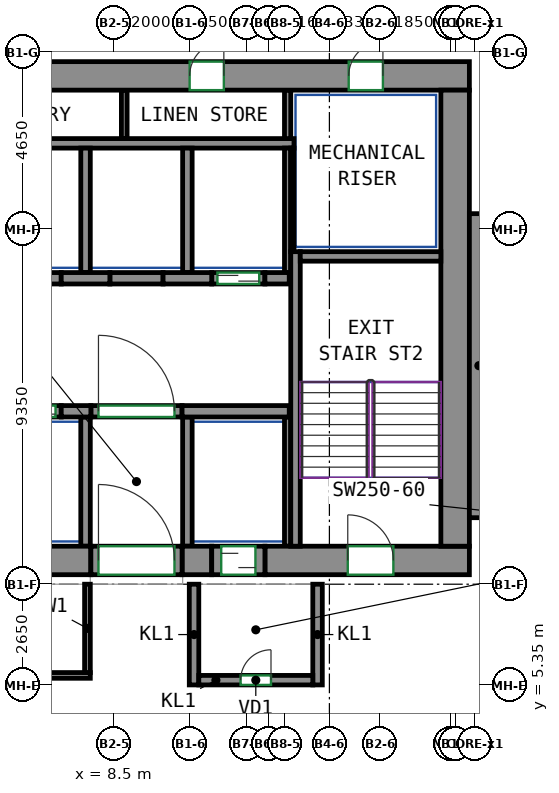
"""IFC4 building model, lengths in metres.
Left out: names, types, materials, properties, quantities, classifications, styles, units other than length and angle.
Written with IfcOpenShell. Run it as: python <this file> out.ifc"""

import sys

from ifc_helpers import new_model, si_unit, direction, frame, frame_2d, origin, place, context, subcontext, project, spatial, rectangle, extrude, source, transform, mapped, element, fill, save


model = new_model("IFC4")
c1 = context("Model", 3, precision=1e-05, world=origin(), true_north=direction((0.0, 1.0)))
c2 = subcontext(c1, "Body", "Model", "MODEL_VIEW")
j1 = project(units=[si_unit("LENGTHUNIT", "METRE"), si_unit("PLANEANGLEUNIT", "RADIAN")], contexts=[c1])
p1 = place(None, origin())
s1 = spatial("IfcSite", under=j1, at=p1, CompositionType="ELEMENT")
p2 = place(p1, origin())
s2 = spatial("IfcBuilding", under=s1, at=p2, CompositionType="ELEMENT")
p3 = place(p2, frame((0.0, 0.0, 185.5)))
s3 = spatial("IfcBuildingStorey", under=s2, at=p3, CompositionType="ELEMENT", Elevation=185.5)
m1 = source(origin(), c2, "Body", "SweptSolid", [
    extrude(rectangle(XDim=14.18, YDim=0.75, at=frame_2d((7.09, 0.0))), origin(), (0.0, 0.0, 1.0), 3.12),
])
p4 = place(p3, frame((-6.29, 8.625, 0.0), z_axis=(0.0, 0.0, 1.0), x_axis=(1.0, 0.0, 0.0)))
e1 = element("IfcWall", 1, at=p4, inside=s3, PredefinedType="SHEAR", context=c2, shape_type="MappedRepresentation", body=[
    mapped(m1, transform((0.0, 0.0, 0.0))),
])
m2 = source(origin(), c2, "Body", "SweptSolid", [
    extrude(rectangle(XDim=0.78, YDim=0.75, at=frame_2d((0.39, 0.0))), origin(), (0.0, 0.0, 1.0), 3.12),
])
p5 = place(p3, frame((10.29, 8.625, 0.0), z_axis=(0.0, 0.0, 1.0), x_axis=(1.0, 0.0, 0.0)))
e2 = element("IfcWall", 2, at=p5, inside=s3, PredefinedType="SHEAR", context=c2, shape_type="MappedRepresentation", body=[
    mapped(m2, transform((0.0, 0.0, 0.0))),
])
m3 = source(origin(), c2, "Body", "SweptSolid", [
    extrude(rectangle(XDim=5.38, YDim=0.75, at=frame_2d((2.69, 0.0))), origin(), (0.0, 0.0, 1.0), 3.12),
])
p6 = place(p3, frame((12.47, 8.625, 0.0), z_axis=(0.0, 0.0, 1.0), x_axis=(1.0, 0.0, 0.0)))
e3 = element("IfcWall", 3, at=p6, inside=s3, PredefinedType="SHEAR", context=c2, shape_type="MappedRepresentation", body=[
    mapped(m3, transform((0.0, 0.0, 0.0))),
])
p7 = place(p6, frame((2.18, 0.0, 0.0)))
e4 = element("IfcOpeningElement", 4, at=p7, cuts=e3, PredefinedType="OPENING", context=c2, shape_type="SweptSolid", body=[
    extrude(rectangle(XDim=1.2, YDim=2.1, at=frame_2d((0.6, 1.05))), frame((0.0, 0.385, 0.0), z_axis=(0.0, -1.0, 0.0), x_axis=(1.0, 0.0, 0.0)), (0.0, 0.0, 1.0), 0.77),
])
m4 = source(origin(), c2, "Body", "SweptSolid", [
    extrude(rectangle(XDim=33.6, YDim=0.75, at=frame_2d((16.8, 0.0))), origin(), (0.0, 0.0, 1.0), 3.12),
])
p8 = place(p3, frame((-15.75, 21.375, 0.0), z_axis=(0.0, 0.0, 1.0), x_axis=(1.0, 0.0, 0.0)))
e5 = element("IfcWall", 5, at=p8, inside=s3, PredefinedType="SHEAR", context=c2, shape_type="MappedRepresentation", body=[
    mapped(m4, transform((0.0, 0.0, 0.0))),
])
p9 = place(p8, frame((5.858, 0.0, 0.0)))
e6 = element("IfcOpeningElement", 6, at=p9, cuts=e5, PredefinedType="OPENING", context=c2, shape_type="SweptSolid", body=[
    extrude(rectangle(XDim=0.9, YDim=2.1, at=frame_2d((0.45, 1.05))), frame((0.0, 0.385, 0.0), z_axis=(0.0, -1.0, 0.0), x_axis=(1.0, 0.0, 0.0)), (0.0, 0.0, 1.0), 0.77),
])
p10 = place(p8, frame((10.923, 0.0, 0.0)))
e7 = element("IfcOpeningElement", 7, at=p10, cuts=e5, PredefinedType="OPENING", context=c2, shape_type="SweptSolid", body=[
    extrude(rectangle(XDim=0.9, YDim=2.1, at=frame_2d((0.45, 1.05))), frame((0.0, 0.385, 0.0), z_axis=(0.0, -1.0, 0.0), x_axis=(1.0, 0.0, 0.0)), (0.0, 0.0, 1.0), 0.77),
])
p11 = place(p8, frame((16.055, 0.0, 0.0)))
e8 = element("IfcOpeningElement", 8, at=p11, cuts=e5, PredefinedType="OPENING", context=c2, shape_type="SweptSolid", body=[
    extrude(rectangle(XDim=0.9, YDim=2.1, at=frame_2d((0.45, 1.05))), frame((0.0, 0.385, 0.0), z_axis=(0.0, -1.0, 0.0), x_axis=(1.0, 0.0, 0.0)), (0.0, 0.0, 1.0), 0.77),
])
p12 = place(p8, frame((20.879, 0.0, 0.0)))
e9 = element("IfcOpeningElement", 9, at=p12, cuts=e5, PredefinedType="OPENING", context=c2, shape_type="SweptSolid", body=[
    extrude(rectangle(XDim=0.9, YDim=2.1, at=frame_2d((0.45, 1.05))), frame((0.0, 0.385, 0.0), z_axis=(0.0, -1.0, 0.0), x_axis=(1.0, 0.0, 0.0)), (0.0, 0.0, 1.0), 0.77),
])
p13 = place(p8, frame((26.239, 0.0, 0.0)))
e10 = element("IfcOpeningElement", 10, at=p13, cuts=e5, PredefinedType="OPENING", context=c2, shape_type="SweptSolid", body=[
    extrude(rectangle(XDim=0.9, YDim=2.1, at=frame_2d((0.45, 1.05))), frame((0.0, 0.385, 0.0), z_axis=(0.0, -1.0, 0.0), x_axis=(1.0, 0.0, 0.0)), (0.0, 0.0, 1.0), 0.77),
])
p14 = place(p8, frame((2.275, 0.0, 0.0)))
e11 = element("IfcOpeningElement", 11, at=p14, cuts=e5, PredefinedType="OPENING", context=c2, shape_type="SweptSolid", body=[
    extrude(rectangle(XDim=0.9, YDim=2.1, at=frame_2d((0.45, 1.05))), frame((0.0, 0.385, 0.0), z_axis=(0.0, -1.0, 0.0), x_axis=(1.0, 0.0, 0.0)), (0.0, 0.0, 1.0), 0.77),
])
p15 = place(p8, frame((30.425, 0.0, 0.0)))
e12 = element("IfcOpeningElement", 12, at=p15, cuts=e5, PredefinedType="OPENING", context=c2, shape_type="SweptSolid", body=[
    extrude(rectangle(XDim=0.9, YDim=2.1, at=frame_2d((0.45, 1.05))), frame((0.0, 0.385, 0.0), z_axis=(0.0, -1.0, 0.0), x_axis=(1.0, 0.0, 0.0)), (0.0, 0.0, 1.0), 0.77),
])
m5 = source(origin(), c2, "Body", "SweptSolid", [
    extrude(rectangle(XDim=12.0, YDim=0.75, at=frame_2d((6.0, 0.0))), origin(), (0.0, 0.0, 1.0), 3.12),
])
p16 = place(p3, frame((17.475, 9.0, 0.0), z_axis=(0.0, 0.0, 1.0), x_axis=(0.0, 1.0, 0.0)))
e13 = element("IfcWall", 13, at=p16, inside=s3, PredefinedType="SHEAR", context=c2, shape_type="MappedRepresentation", body=[
    mapped(m5, transform((0.0, 0.0, 0.0))),
])
m6 = source(origin(), c2, "Body", "SweptSolid", [
    extrude(rectangle(XDim=7.75, YDim=0.25, at=frame_2d((3.875, 0.0))), origin(), (0.0, 0.0, 1.0), 3.12),
])
p17 = place(p3, frame((13.275, 9.0, 0.0), z_axis=(0.0, 0.0, 1.0), x_axis=(0.0, 1.0, 0.0)))
e14 = element("IfcWall", 14, at=p17, inside=s3, PredefinedType="SHEAR", context=c2, shape_type="MappedRepresentation", body=[
    mapped(m6, transform((0.0, 0.0, 0.0))),
])
m7 = source(origin(), c2, "Body", "SweptSolid", [
    extrude(rectangle(XDim=3.7, YDim=0.25, at=frame_2d((1.85, 0.0))), origin(), (0.0, 0.0, 1.0), 3.12),
])
p18 = place(p3, frame((13.4, 16.625, 0.0), z_axis=(0.0, 0.0, 1.0), x_axis=(1.0, 0.0, 0.0)))
e15 = element("IfcWall", 15, at=p18, inside=s3, PredefinedType="SHEAR", context=c2, shape_type="MappedRepresentation", body=[
    mapped(m7, transform((0.0, 0.0, 0.0))),
])
m8 = source(origin(), c2, "Body", "SweptSolid", [
    extrude(rectangle(XDim=8.0, YDim=0.5, at=frame_2d((4.0, 0.0))), origin(), (0.0, 0.0, 1.0), 3.12),
])
p19 = place(p3, frame((18.1, 9.75, 0.0), z_axis=(0.0, 0.0, 1.0), x_axis=(0.0, 1.0, 0.0)))
e16 = element("IfcWall", 16, at=p19, inside=s3, PredefinedType="SHEAR", context=c2, shape_type="MappedRepresentation", body=[
    mapped(m8, transform((0.0, 0.0, 0.0))),
])
m9 = source(origin(), c2, "Body", "SweptSolid", [
    extrude(rectangle(XDim=0.78, YDim=0.3, at=frame_2d((0.39, 0.0))), origin(), (0.0, 0.0, 1.0), 3.12),
])
p20 = place(p3, frame((7.11, 12.55, 0.0), z_axis=(0.0, 0.0, 1.0), x_axis=(1.0, 0.0, 0.0)))
e17 = element("IfcWall", 17, at=p20, inside=s3, PredefinedType="SHEAR", context=c2, shape_type="MappedRepresentation", body=[
    mapped(m9, transform((0.0, 0.0, 0.0))),
])
m10 = source(origin(), c2, "Body", "SweptSolid", [
    extrude(rectangle(XDim=2.82, YDim=0.3, at=frame_2d((1.41, 0.0))), origin(), (0.0, 0.0, 1.0), 3.12),
])
p21 = place(p3, frame((10.29, 12.55, 0.0), z_axis=(0.0, 0.0, 1.0), x_axis=(1.0, 0.0, 0.0)))
e18 = element("IfcWall", 18, at=p21, inside=s3, PredefinedType="SHEAR", context=c2, shape_type="MappedRepresentation", body=[
    mapped(m10, transform((0.0, 0.0, 0.0))),
])
m11 = source(origin(), c2, "Body", "SweptSolid", [
    extrude(rectangle(XDim=1.28, YDim=0.3, at=frame_2d((0.64, 0.0))), origin(), (0.0, 0.0, 1.0), 3.12),
])
p22 = place(p3, frame((7.11, 16.05, 0.0), z_axis=(0.0, 0.0, 1.0), x_axis=(1.0, 0.0, 0.0)))
e19 = element("IfcWall", 19, at=p22, inside=s3, PredefinedType="SHEAR", context=c2, shape_type="MappedRepresentation", body=[
    mapped(m11, transform((0.0, 0.0, 0.0))),
])
m12 = source(origin(), c2, "Body", "SweptSolid", [
    extrude(rectangle(XDim=1.28, YDim=0.3, at=frame_2d((0.64, 0.0))), origin(), (0.0, 0.0, 1.0), 3.12),
])
p23 = place(p3, frame((9.79, 16.05, 0.0), z_axis=(0.0, 0.0, 1.0), x_axis=(1.0, 0.0, 0.0)))
e20 = element("IfcWall", 20, at=p23, inside=s3, PredefinedType="SHEAR", context=c2, shape_type="MappedRepresentation", body=[
    mapped(m12, transform((0.0, 0.0, 0.0))),
])
m13 = source(origin(), c2, "Body", "SweptSolid", [
    extrude(rectangle(XDim=0.64, YDim=0.3, at=frame_2d((0.32, 0.0))), origin(), (0.0, 0.0, 1.0), 3.12),
])
p24 = place(p3, frame((12.47, 16.05, 0.0), z_axis=(0.0, 0.0, 1.0), x_axis=(1.0, 0.0, 0.0)))
e21 = element("IfcWall", 21, at=p24, inside=s3, PredefinedType="SHEAR", context=c2, shape_type="MappedRepresentation", body=[
    mapped(m13, transform((0.0, 0.0, 0.0))),
])
m14 = source(origin(), c2, "Body", "SweptSolid", [
    extrude(rectangle(XDim=1.4, YDim=0.3, at=frame_2d((0.7, 0.0))), origin(), (0.0, 0.0, 1.0), 3.12),
])
p25 = place(p3, frame((5.71, 12.55, 0.0), z_axis=(0.0, 0.0, 1.0), x_axis=(1.0, 0.0, 0.0)))
e22 = element("IfcWall", 22, at=p25, inside=s3, PredefinedType="PARTITIONING", context=c2, shape_type="MappedRepresentation", body=[
    mapped(m14, transform((0.0, 0.0, 0.0))),
])
p26 = place(p25, frame((0.15, 0.0, 0.0)))
e23 = element("IfcOpeningElement", 23, at=p26, cuts=e22, PredefinedType="OPENING", context=c2, shape_type="SweptSolid", body=[
    extrude(rectangle(XDim=1.1, YDim=2.1, at=frame_2d((0.55, 1.05))), frame((0.0, 0.16, 0.0), z_axis=(0.0, -1.0, 0.0), x_axis=(1.0, 0.0, 0.0)), (0.0, 0.0, 1.0), 0.32),
])
m15 = source(origin(), c2, "Body", "SweptSolid", [
    extrude(rectangle(XDim=1.4, YDim=0.3, at=frame_2d((0.7, 0.0))), origin(), (0.0, 0.0, 1.0), 3.12),
])
p27 = place(p3, frame((11.07, 16.05, 0.0), z_axis=(0.0, 0.0, 1.0), x_axis=(1.0, 0.0, 0.0)))
e24 = element("IfcWall", 24, at=p27, inside=s3, PredefinedType="PARTITIONING", context=c2, shape_type="MappedRepresentation", body=[
    mapped(m15, transform((0.0, 0.0, 0.0))),
])
p28 = place(p27, frame((0.15, 0.0, 0.0)))
e25 = element("IfcOpeningElement", 25, at=p28, cuts=e24, PredefinedType="OPENING", context=c2, shape_type="SweptSolid", body=[
    extrude(rectangle(XDim=1.1, YDim=2.1, at=frame_2d((0.55, 1.05))), frame((0.0, 0.16, 0.0), z_axis=(0.0, -1.0, 0.0), x_axis=(1.0, 0.0, 0.0)), (0.0, 0.0, 1.0), 0.32),
])
m16 = source(origin(), c2, "Body", "SweptSolid", [
    extrude(rectangle(XDim=2.4, YDim=0.3, at=frame_2d((1.2, 0.0))), origin(), (0.0, 0.0, 1.0), 3.12),
])
p29 = place(p3, frame((7.89, 12.55, 0.0), z_axis=(0.0, 0.0, 1.0), x_axis=(1.0, 0.0, 0.0)))
e26 = element("IfcWall", 26, at=p29, inside=s3, PredefinedType="PARTITIONING", context=c2, shape_type="MappedRepresentation", body=[
    mapped(m16, transform((0.0, 0.0, 0.0))),
])
p30 = place(p29, frame((0.2, 0.0, 0.0)))
e27 = element("IfcOpeningElement", 27, at=p30, cuts=e26, PredefinedType="OPENING", context=c2, shape_type="SweptSolid", body=[
    extrude(rectangle(XDim=2.0, YDim=2.1, at=frame_2d((1.0, 1.05))), frame((0.0, 0.16, 0.0), z_axis=(0.0, -1.0, 0.0), x_axis=(1.0, 0.0, 0.0)), (0.0, 0.0, 1.0), 0.32),
])
for number, where, z_axis, x_axis in (
    (28, (5.71, 16.05, 0.0), (0.0, 0.0, 1.0), (1.0, 0.0, 0.0)),
    (29, (8.39, 16.05, 0.0), (0.0, 0.0, 1.0), (1.0, 0.0, 0.0)),
):
    element("IfcWall", number, at=place(p3, frame(where, z_axis=z_axis, x_axis=x_axis)), inside=s3, PredefinedType="PARTITIONING", context=c2, shape_type="MappedRepresentation", body=[
        mapped(m14, transform((0.0, 0.0, 0.0))),
    ])
m17 = source(origin(), c2, "Body", "SweptSolid", [
    extrude(rectangle(XDim=2.65, YDim=0.25, at=frame_2d((1.325, 0.0))), origin(), (0.0, 0.0, 1.0), 3.12),
])
for number, where, z_axis, x_axis in (
    (30, (10.605, 5.35, 0.0), (0.0, 0.0, 1.0), (0.0, 1.0, 0.0)),
    (31, (13.855, 5.35, 0.0), (0.0, 0.0, 1.0), (0.0, 1.0, 0.0)),
):
    element("IfcWall", number, at=place(p3, frame(where, z_axis=z_axis, x_axis=x_axis)), inside=s3, PredefinedType="PARTITIONING", context=c2, shape_type="MappedRepresentation", body=[
        mapped(m17, transform((0.0, 0.0, 0.0))),
    ])
m18 = source(origin(), c2, "Body", "SweptSolid", [
    extrude(rectangle(XDim=3.0, YDim=0.25, at=frame_2d((1.5, 0.0))), origin(), (0.0, 0.0, 1.0), 3.12),
])
p31 = place(p3, frame((10.73, 5.475, 0.0), z_axis=(0.0, 0.0, 1.0), x_axis=(1.0, 0.0, 0.0)))
e32 = element("IfcWall", 32, at=p31, inside=s3, PredefinedType="PARTITIONING", context=c2, shape_type="MappedRepresentation", body=[
    mapped(m18, transform((0.0, 0.0, 0.0))),
])
p32 = place(p31, frame((1.1, 0.0, 0.0)))
e33 = element("IfcOpeningElement", 33, at=p32, cuts=e32, PredefinedType="OPENING", context=c2, shape_type="SweptSolid", body=[
    extrude(rectangle(XDim=0.8, YDim=2.0, at=frame_2d((0.4, 1.0))), frame((0.0, 0.135, 0.0), z_axis=(0.0, -1.0, 0.0), x_axis=(1.0, 0.0, 0.0)), (0.0, 0.0, 1.0), 0.27),
])
m19 = source(origin(), c2, "Body", "SweptSolid", [
    extrude(rectangle(XDim=10.97, YDim=0.25, at=frame_2d((5.485, 0.0))), origin(), (0.0, 0.0, 1.0), 3.12),
])
p33 = place(p3, frame((2.265, 19.6, 0.0), z_axis=(0.0, 0.0, 1.0), x_axis=(1.0, 0.0, 0.0)))
e34 = element("IfcWall", 34, at=p33, inside=s3, PredefinedType="PARTITIONING", context=c2, shape_type="MappedRepresentation", body=[
    mapped(m19, transform((0.0, 0.0, 0.0))),
])
m20 = source(origin(), c2, "Body", "SweptSolid", [
    extrude(rectangle(XDim=3.275, YDim=0.165, at=frame_2d((1.638, 0.0))), origin(), (0.0, 0.0, 1.0), 3.12),
])
p34 = place(p3, frame((13.067, 16.2, 0.0), z_axis=(0.0, 0.0, 1.0), x_axis=(0.0, 1.0, 0.0)))
e35 = element("IfcWall", 35, at=p34, inside=s3, PredefinedType="PARTITIONING", context=c2, shape_type="MappedRepresentation", body=[
    mapped(m20, transform((0.0, 0.0, 0.0))),
])
m21 = source(origin(), c2, "Body", "SweptSolid", [
    extrude(rectangle(XDim=1.275, YDim=0.165, at=frame_2d((0.637, 0.0))), origin(), (0.0, 0.0, 1.0), 3.12),
])
p35 = place(p3, frame((13.067, 19.725, 0.0), z_axis=(0.0, 0.0, 1.0), x_axis=(0.0, 1.0, 0.0)))
e36 = element("IfcWall", 36, at=p35, inside=s3, PredefinedType="PARTITIONING", context=c2, shape_type="MappedRepresentation", body=[
    mapped(m21, transform((0.0, 0.0, 0.0))),
])
m22 = source(origin(), c2, "Body", "SweptSolid", [
    extrude(rectangle(XDim=3.275, YDim=0.25, at=frame_2d((1.638, 0.0))), origin(), (0.0, 0.0, 1.0), 3.12),
])
p36 = place(p3, frame((10.43, 16.2, 0.0), z_axis=(0.0, 0.0, 1.0), x_axis=(0.0, 1.0, 0.0)))
e37 = element("IfcWall", 37, at=p36, inside=s3, PredefinedType="PARTITIONING", context=c2, shape_type="MappedRepresentation", body=[
    mapped(m22, transform((0.0, 0.0, 0.0))),
])
m23 = source(origin(), c2, "Body", "SweptSolid", [
    extrude(rectangle(XDim=2.725, YDim=0.085, at=frame_2d((1.363, 0.0))), origin(), (0.0, 0.0, 1.0), 3.12),
])
p37 = place(p3, frame((13.192, 16.75, 0.0), z_axis=(0.0, 0.0, 1.0), x_axis=(0.0, 1.0, 0.0)))
e38 = element("IfcWall", 38, at=p37, inside=s3, PredefinedType="PARTITIONING", context=c2, shape_type="MappedRepresentation", body=[
    mapped(m23, transform((0.0, 0.0, 0.0))),
])
p38 = place(p3, frame((7.75, 16.2, 0.0), z_axis=(0.0, 0.0, 1.0), x_axis=(0.0, 1.0, 0.0)))
e39 = element("IfcWall", 39, at=p38, inside=s3, PredefinedType="PARTITIONING", context=c2, shape_type="MappedRepresentation", body=[
    mapped(m22, transform((0.0, 0.0, 0.0))),
])
m24 = source(origin(), c2, "Body", "SweptSolid", [
    extrude(rectangle(XDim=3.4, YDim=0.25, at=frame_2d((1.7, 0.0))), origin(), (0.0, 0.0, 1.0), 3.12),
])
p39 = place(p3, frame((10.43, 9.0, 0.0), z_axis=(0.0, 0.0, 1.0), x_axis=(0.0, 1.0, 0.0)))
e40 = element("IfcWall", 40, at=p39, inside=s3, PredefinedType="PARTITIONING", context=c2, shape_type="MappedRepresentation", body=[
    mapped(m24, transform((0.0, 0.0, 0.0))),
])
m25 = source(origin(), c2, "Body", "SweptSolid", [
    extrude(rectangle(XDim=3.4, YDim=0.165, at=frame_2d((1.7, 0.0))), origin(), (0.0, 0.0, 1.0), 3.12),
])
p40 = place(p3, frame((13.067, 9.0, 0.0), z_axis=(0.0, 0.0, 1.0), x_axis=(0.0, 1.0, 0.0)))
e41 = element("IfcWall", 41, at=p40, inside=s3, PredefinedType="PARTITIONING", context=c2, shape_type="MappedRepresentation", body=[
    mapped(m25, transform((0.0, 0.0, 0.0))),
])
p41 = place(p3, frame((7.75, 9.0, 0.0), z_axis=(0.0, 0.0, 1.0), x_axis=(0.0, 1.0, 0.0)))
e42 = element("IfcWall", 42, at=p41, inside=s3, PredefinedType="PARTITIONING", context=c2, shape_type="MappedRepresentation", body=[
    mapped(m24, transform((0.0, 0.0, 0.0))),
])
m26 = source(origin(), c2, "Body", "SweptSolid", [
    extrude(rectangle(XDim=1.275, YDim=0.15, at=frame_2d((0.637, 0.0))), origin(), (0.0, 0.0, 1.0), 3.12),
])
p42 = place(p3, frame((8.768, 19.725, 0.0), z_axis=(0.0, 0.0, 1.0), x_axis=(0.0, 1.0, 0.0)))
e43 = element("IfcWall", 43, at=p42, inside=s3, PredefinedType="PARTITIONING", context=c2, shape_type="MappedRepresentation", body=[
    mapped(m26, transform((0.0, 0.0, 0.0))),
])
m27 = source(origin(), c2, "Body", "SweptSolid", [
    extrude(rectangle(XDim=2.4, YDim=0.75, at=frame_2d((1.2, 0.0))), origin(), (0.0, 0.0, 1.0), 2.7),
])
p43 = place(p3, frame((7.89, 8.625, 0.0), z_axis=(0.0, 0.0, 1.0), x_axis=(1.0, 0.0, 0.0)))
e44 = element("IfcWall", 44, at=p43, inside=s3, PredefinedType="PARTITIONING", context=c2, shape_type="MappedRepresentation", body=[
    mapped(m27, transform((0.0, 0.0, 0.0))),
])
p44 = place(p43, frame((0.2, 0.0, 0.0)))
e45 = element("IfcOpeningElement", 45, at=p44, cuts=e44, PredefinedType="OPENING", context=c2, shape_type="SweptSolid", body=[
    extrude(rectangle(XDim=2.0, YDim=2.1, at=frame_2d((1.0, 1.05))), frame((0.0, 0.385, 0.0), z_axis=(0.0, -1.0, 0.0), x_axis=(1.0, 0.0, 0.0)), (0.0, 0.0, 1.0), 0.77),
])
m28 = source(origin(), c2, "Body", "SweptSolid", [
    extrude(rectangle(XDim=1.4, YDim=0.75, at=frame_2d((0.7, 0.0))), origin(), (0.0, 0.0, 1.0), 2.7),
])
p45 = place(p3, frame((11.07, 8.625, 0.0), z_axis=(0.0, 0.0, 1.0), x_axis=(1.0, 0.0, 0.0)))
e46 = element("IfcWall", 46, at=p45, inside=s3, PredefinedType="PARTITIONING", context=c2, shape_type="MappedRepresentation", body=[
    mapped(m28, transform((0.0, 0.0, 0.0))),
])
p46 = place(p45, frame((0.25, 0.0, 0.0)))
e47 = element("IfcOpeningElement", 47, at=p46, cuts=e46, PredefinedType="OPENING", context=c2, shape_type="SweptSolid", body=[
    extrude(rectangle(XDim=0.9, YDim=2.1, at=frame_2d((0.45, 1.05))), frame((0.0, 0.385, 0.0), z_axis=(0.0, -1.0, 0.0), x_axis=(1.0, 0.0, 0.0)), (0.0, 0.0, 1.0), 0.77),
])
p47 = place(p3, frame((7.875, 5.6, 0.0), z_axis=(0.0, 0.0, 1.0), x_axis=(-1.0, 0.0, 0.0)))
e48 = element("IfcWall", 48, at=p47, inside=s3, PredefinedType="PARTITIONING", context=c2, shape_type="SweptSolid", body=[
    extrude(rectangle(XDim=13.275, YDim=0.15, at=frame_2d((6.637, 0.0))), origin(), (0.0, 0.0, 1.0), 3.12),
])
p48 = place(p47, frame((1.609, 0.0, 0.0)))
e49 = element("IfcOpeningElement", 49, at=p48, cuts=e48, PredefinedType="OPENING", context=c2, shape_type="SweptSolid", body=[
    extrude(rectangle(XDim=1.0, YDim=2.1, at=frame_2d((0.5, 1.05))), frame((0.0, 0.085, 0.0), z_axis=(0.0, -1.0, 0.0), x_axis=(1.0, 0.0, 0.0)), (0.0, 0.0, 1.0), 0.17),
])
p49 = place(p3, frame((7.8, 8.0, 0.0), z_axis=(0.0, 0.0, 1.0), x_axis=(0.0, -1.0, 0.0)))
e50 = element("IfcWall", 50, at=p49, inside=s3, PredefinedType="PARTITIONING", context=c2, shape_type="SweptSolid", body=[
    extrude(rectangle(XDim=2.325, YDim=0.15, at=frame_2d((1.163, 0.0))), origin(), (0.0, 0.0, 1.0), 3.12),
])
p50 = place(p30, origin())
e51 = element("IfcDoor", 51, at=p50, inside=s3, OperationType="DOUBLE_DOOR_SINGLE_SWING", PredefinedType="DOOR", context=c2, shape_type="SweptSolid", body=[
    extrude(rectangle(XDim=2.0, YDim=2.1, at=frame_2d((1.0, 1.05))), frame((0.0, 0.025, 0.0), z_axis=(0.0, -1.0, 0.0), x_axis=(1.0, 0.0, 0.0)), (0.0, 0.0, 1.0), 0.05),
])
fill(e27, e51)
p51 = place(p44, origin())
e52 = element("IfcDoor", 52, at=p51, inside=s3, OperationType="DOUBLE_DOOR_SINGLE_SWING", PredefinedType="DOOR", context=c2, shape_type="SweptSolid", body=[
    extrude(rectangle(XDim=2.0, YDim=2.1, at=frame_2d((1.0, 1.05))), frame((0.0, 0.28, 0.0), z_axis=(0.0, -1.0, 0.0), x_axis=(1.0, 0.0, 0.0)), (0.0, 0.0, 1.0), 0.05),
])
fill(e45, e52)
p52 = place(p32, origin())
e53 = element("IfcDoor", 53, at=p52, inside=s3, OperationType="SINGLE_SWING_RIGHT", PredefinedType="DOOR", context=c2, shape_type="SweptSolid", body=[
    extrude(rectangle(XDim=0.8, YDim=2.0, at=frame_2d((0.4, 1.0))), frame((0.0, 0.025, 0.0), z_axis=(0.0, -1.0, 0.0), x_axis=(1.0, 0.0, 0.0)), (0.0, 0.0, 1.0), 0.05),
])
fill(e33, e53)
p53 = place(p46, origin())
e54 = element("IfcDoor", 54, at=p53, inside=s3, OperationType="SLIDING_TO_LEFT", PredefinedType="DOOR", context=c2, shape_type="SweptSolid", body=[
    extrude(rectangle(XDim=0.9, YDim=2.1, at=frame_2d((0.45, 1.05))), frame((0.0, 0.28, 0.0), z_axis=(0.0, -1.0, 0.0), x_axis=(1.0, 0.0, 0.0)), (0.0, 0.0, 1.0), 0.05),
])
fill(e47, e54)
p54 = place(p26, origin())
e55 = element("IfcDoor", 55, at=p54, inside=s3, OperationType="DOUBLE_DOOR_SLIDING", PredefinedType="DOOR", context=c2, shape_type="SweptSolid", body=[
    extrude(rectangle(XDim=1.1, YDim=2.1, at=frame_2d((0.55, 1.05))), frame((0.0, 0.025, 0.0), z_axis=(0.0, -1.0, 0.0), x_axis=(1.0, 0.0, 0.0)), (0.0, 0.0, 1.0), 0.05),
])
fill(e23, e55)
p55 = place(p28, origin())
e56 = element("IfcDoor", 56, at=p55, inside=s3, OperationType="DOUBLE_DOOR_SLIDING", PredefinedType="DOOR", context=c2, shape_type="SweptSolid", body=[
    extrude(rectangle(XDim=1.1, YDim=2.1, at=frame_2d((0.55, 1.05))), frame((0.0, 0.025, 0.0), z_axis=(0.0, -1.0, 0.0), x_axis=(1.0, 0.0, 0.0)), (0.0, 0.0, 1.0), 0.05),
])
fill(e25, e56)
p56 = place(p13, origin())
e57 = element("IfcDoor", 57, at=p56, inside=s3, OperationType="SINGLE_SWING_RIGHT", PredefinedType="DOOR", context=c2, shape_type="SweptSolid", body=[
    extrude(rectangle(XDim=0.9, YDim=2.1, at=frame_2d((0.45, 1.05))), frame((0.0, -0.23, 0.0), z_axis=(0.0, -1.0, 0.0), x_axis=(1.0, 0.0, 0.0)), (0.0, 0.0, 1.0), 0.05),
])
fill(e10, e57)
p57 = place(p15, origin())
e58 = element("IfcDoor", 58, at=p57, inside=s3, OperationType="SINGLE_SWING_RIGHT", PredefinedType="DOOR", context=c2, shape_type="SweptSolid", body=[
    extrude(rectangle(XDim=0.9, YDim=2.1, at=frame_2d((0.45, 1.05))), frame((0.0, -0.23, 0.0), z_axis=(0.0, -1.0, 0.0), x_axis=(1.0, 0.0, 0.0)), (0.0, 0.0, 1.0), 0.05),
])
fill(e12, e58)
p58 = place(p7, origin())
e59 = element("IfcDoor", 59, at=p58, inside=s3, OperationType="DOUBLE_DOOR_SINGLE_SWING", PredefinedType="DOOR", context=c2, shape_type="SweptSolid", body=[
    extrude(rectangle(XDim=1.2, YDim=2.1, at=frame_2d((0.6, 1.05))), frame((0.0, 0.28, 0.0), z_axis=(0.0, -1.0, 0.0), x_axis=(1.0, 0.0, 0.0)), (0.0, 0.0, 1.0), 0.05),
])
fill(e4, e59)
save(model, sys.argv[1])
